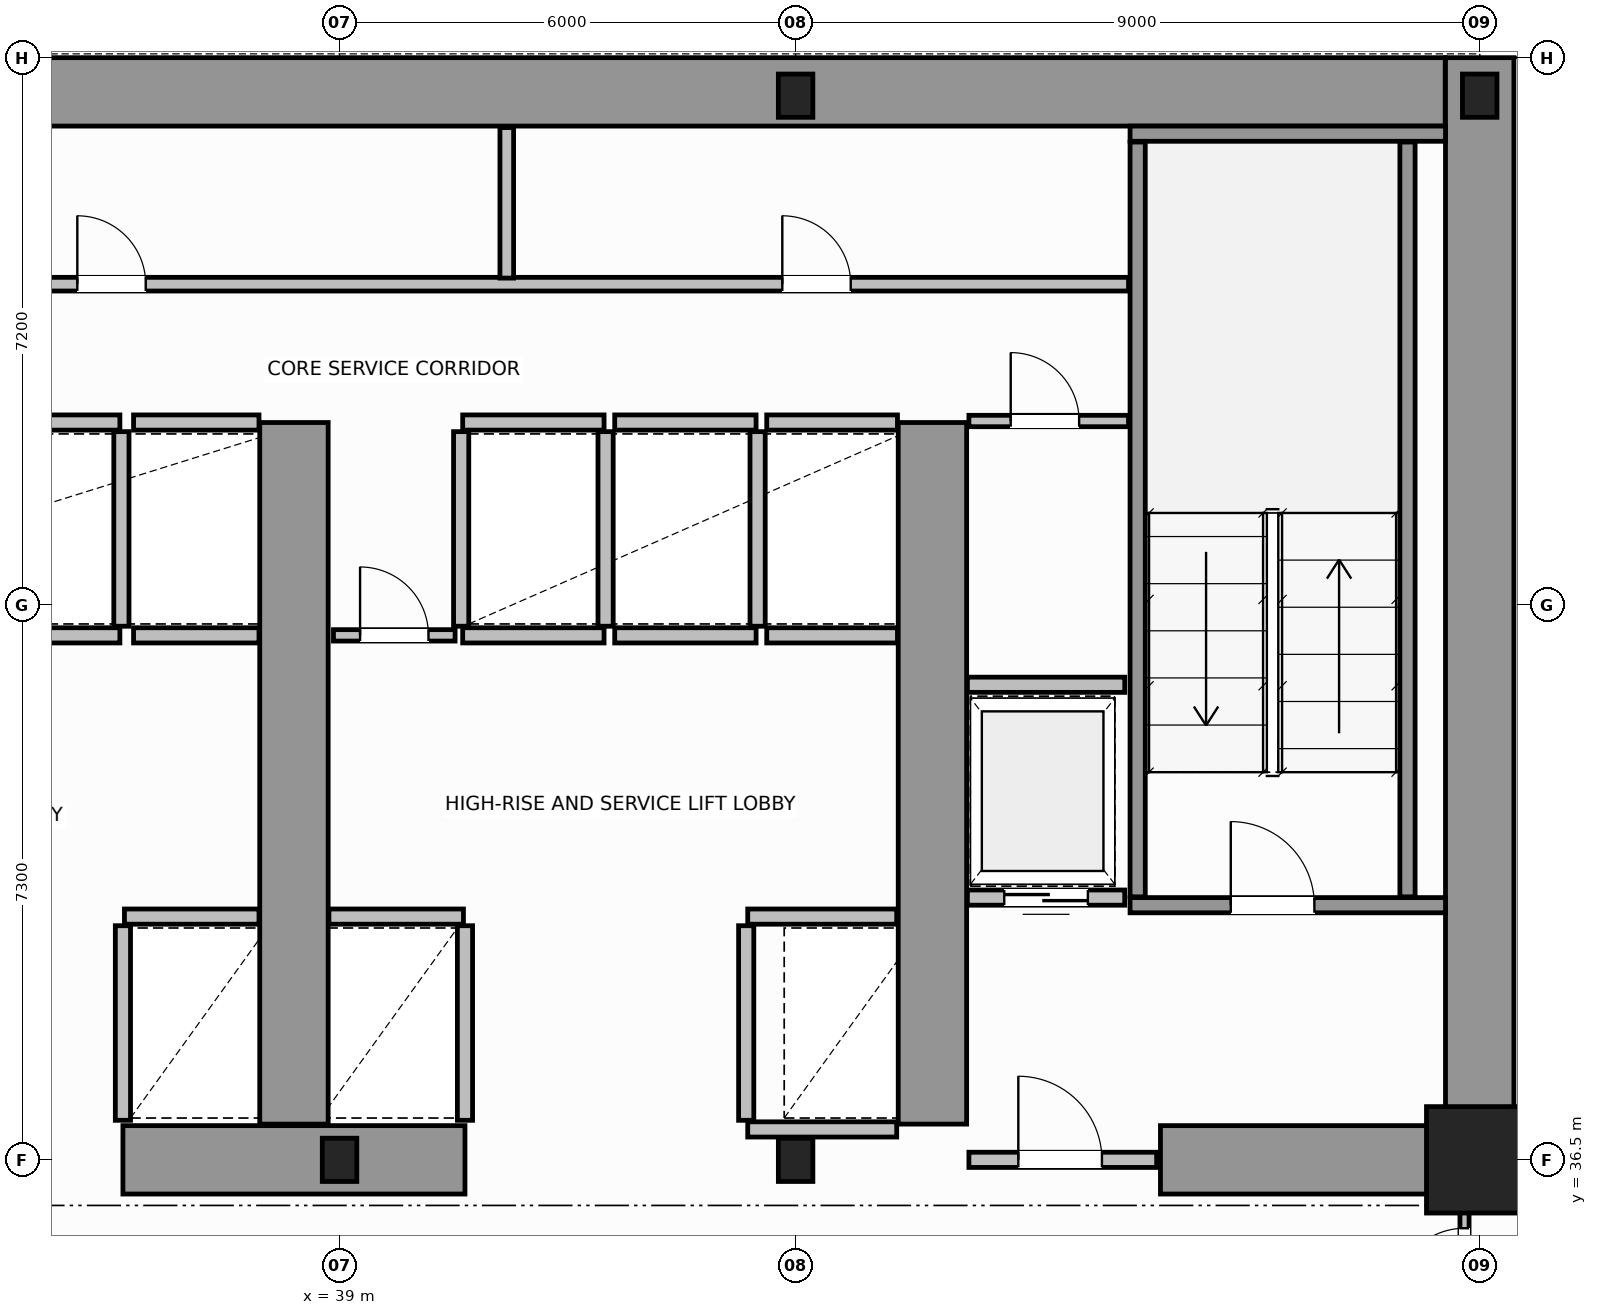
"""IFC4 building model, lengths in metres.
Left out: names, types, materials, properties, quantities, classifications, styles, units other than length and angle.
Written with IfcOpenShell. Run it as: python <this file> out.ifc"""

import sys

from ifc_helpers import new_model, si_unit, direction, frame, frame_2d, origin, origin_2d, place, context, subcontext, project, spatial, rectangle, i_section, extrude, source, transform, mapped, element, fill, save


model = new_model("IFC4")
c1 = context("Model", 3, precision=1e-05, world=origin(), true_north=direction((0.0, 1.0)))
c2 = subcontext(c1, "Body", "Model", "MODEL_VIEW")
j1 = project(units=[si_unit("LENGTHUNIT", "METRE"), si_unit("PLANEANGLEUNIT", "RADIAN")], contexts=[c1])
p1 = place(None, origin())
s1 = spatial("IfcSite", under=j1, at=p1, CompositionType="ELEMENT")
p2 = place(p1, origin())
s2 = spatial("IfcBuilding", under=s1, at=p2, CompositionType="ELEMENT")
p3 = place(p2, frame((0.0, 0.0, 68.2)))
s3 = spatial("IfcBuildingStorey", under=s2, at=p3, CompositionType="ELEMENT", Elevation=68.2)
m1 = source(origin(), c2, "Body", "SweptSolid", [
    extrude(i_section(OverallWidth=0.454, OverallDepth=0.569, WebThickness=0.078, FlangeThickness=0.08, FilletRadius=0.015, at=origin_2d()), origin(), (0.0, 0.0, 1.0), 3.8),
])
for number, where, z_axis, x_axis in (
    (1, (39.0, 36.5, 0.0), (0.0, 0.0, 1.0), (1.0, 0.0, 0.0)),
    (2, (45.0, 36.5, 0.0), (0.0, 0.0, 1.0), (1.0, 0.0, 0.0)),
):
    element("IfcColumn", number, at=place(p3, frame(where, z_axis=z_axis, x_axis=x_axis)), inside=s3, PredefinedType="COLUMN", context=c2, shape_type="MappedRepresentation", body=[
        mapped(m1, transform((0.0, 0.0, 0.0), scale=1.0)),
    ])
m2 = source(origin(), c2, "Body", "SweptSolid", [
    extrude(rectangle(XDim=1.4, YDim=1.4, at=origin_2d()), origin(), (0.0, 0.0, 1.0), 3.8),
])
p4 = place(p3, frame((54.0, 36.5, 0.0), z_axis=(0.0, 0.0, 1.0), x_axis=(1.0, 0.0, 0.0)))
e3 = element("IfcColumn", 3, at=p4, inside=s3, PredefinedType="COLUMN", context=c2, shape_type="MappedRepresentation", body=[
    mapped(m2, transform((0.0, 0.0, 0.0), scale=1.0)),
])
for number, where, z_axis, x_axis in (
    (4, (45.0, 50.5, 0.0), (0.0, 0.0, 1.0), (1.0, 0.0, 0.0)),
    (5, (54.0, 50.5, 0.0), (0.0, 0.0, 1.0), (1.0, 0.0, 0.0)),
):
    element("IfcColumn", number, at=place(p3, frame(where, z_axis=z_axis, x_axis=x_axis)), inside=s3, PredefinedType="COLUMN", context=c2, shape_type="MappedRepresentation", body=[
        mapped(m1, transform((0.0, 0.0, 0.0), scale=1.0)),
    ])
p5 = place(p3, frame((34.002, 50.55, 0.0), z_axis=(0.0, 0.0, 1.0), x_axis=(1.0, 0.0, 0.0)))
e6 = element("IfcWall", 6, at=p5, inside=s3, PredefinedType="SHEAR", context=c2, shape_type="SweptSolid", body=[
    extrude(rectangle(XDim=19.544, YDim=0.9, at=frame_2d((9.772, 0.0))), origin(), (0.0, 0.0, 1.0), 3.8),
])
p6 = place(p3, frame((54.0, 36.5, 0.0), z_axis=(0.0, 0.0, 1.0), x_axis=(0.0, 1.0, 0.0)))
e7 = element("IfcWall", 7, at=p6, inside=s3, PredefinedType="SHEAR", context=c2, shape_type="SweptSolid", body=[
    extrude(rectangle(XDim=14.5, YDim=0.9, at=frame_2d((7.25, 0.0))), origin(), (0.0, 0.0, 1.0), 3.8),
])
p7 = place(p3, frame((36.15, 36.5, 0.0), z_axis=(0.0, 0.0, 1.0), x_axis=(1.0, 0.0, 0.0)))
e8 = element("IfcWall", 8, at=p7, inside=s3, PredefinedType="SHEAR", context=c2, shape_type="SweptSolid", body=[
    extrude(rectangle(XDim=4.5, YDim=0.9, at=frame_2d((2.25, 0.0))), origin(), (0.0, 0.0, 1.0), 3.8),
])
p8 = place(p3, frame((49.8, 36.5, 0.0), z_axis=(0.0, 0.0, 1.0), x_axis=(1.0, 0.0, 0.0)))
e9 = element("IfcWall", 9, at=p8, inside=s3, PredefinedType="SHEAR", context=c2, shape_type="SweptSolid", body=[
    extrude(rectangle(XDim=3.73, YDim=0.9, at=frame_2d((1.865, 0.0))), origin(), (0.0, 0.0, 1.0), 2.38),
])
for number, where, z_axis, x_axis in (
    (10, (38.4, 36.97, 0.0), (0.0, 0.0, 1.0), (0.0, 1.0, 0.0)),
    (11, (46.8, 36.97, 0.0), (0.0, 0.0, 1.0), (0.0, 1.0, 0.0)),
):
    element("IfcWall", number, at=place(p3, frame(where, z_axis=z_axis, x_axis=x_axis)), inside=s3, PredefinedType="SHEAR", context=c2, shape_type="SweptSolid", body=[
        extrude(rectangle(XDim=9.23, YDim=0.9, at=frame_2d((4.615, 0.0))), origin(), (0.0, 0.0, 1.0), 3.8),
    ])
p9 = place(p3, frame((49.4, 39.85, 0.0), z_axis=(0.0, 0.0, 1.0), x_axis=(1.0, 0.0, 0.0)))
e12 = element("IfcWall", 12, at=p9, inside=s3, PredefinedType="SOLIDWALL", context=c2, shape_type="SweptSolid", body=[
    extrude(rectangle(XDim=4.15, YDim=0.2, at=frame_2d((2.075, 0.0))), origin(), (0.0, 0.0, 1.0), 3.8),
])
p10 = place(p9, frame((1.325, 0.0, 0.0)))
e13 = element("IfcOpeningElement", 13, at=p10, cuts=e12, PredefinedType="OPENING", context=c2, shape_type="SweptSolid", body=[
    extrude(rectangle(XDim=1.1, YDim=2.15, at=frame_2d((0.55, 1.075))), frame((0.0, 0.11, 0.0), z_axis=(0.0, -1.0, 0.0), x_axis=(1.0, 0.0, 0.0)), (0.0, 0.0, 1.0), 0.22),
])
p11 = place(p3, frame((49.4, 50.0, 0.0), z_axis=(0.0, 0.0, 1.0), x_axis=(1.0, 0.0, 0.0)))
e14 = element("IfcWall", 14, at=p11, inside=s3, PredefinedType="SOLIDWALL", context=c2, shape_type="SweptSolid", body=[
    extrude(rectangle(XDim=4.15, YDim=0.2, at=frame_2d((2.075, 0.0))), origin(), (0.0, 0.0, 1.0), 3.8),
])
for number, where, z_axis, x_axis in (
    (15, (49.5, 39.96, 0.0), (0.0, 0.0, 1.0), (0.0, 1.0, 0.0)),
    (16, (53.05, 39.96, 0.0), (0.0, 0.0, 1.0), (0.0, 1.0, 0.0)),
):
    element("IfcWall", number, at=place(p3, frame(where, z_axis=z_axis, x_axis=x_axis)), inside=s3, PredefinedType="SOLIDWALL", context=c2, shape_type="SweptSolid", body=[
        extrude(rectangle(XDim=9.93, YDim=0.2, at=frame_2d((4.965, 0.0))), origin(), (0.0, 0.0, 1.0), 3.8),
    ])
p12 = place(p3, frame((47.28, 36.5, 0.0), z_axis=(0.0, 0.0, 1.0), x_axis=(1.0, 0.0, 0.0)))
e17 = element("IfcWall", 17, at=p12, inside=s3, PredefinedType="SOLIDWALL", context=c2, shape_type="SweptSolid", body=[
    extrude(rectangle(XDim=2.47, YDim=0.2, at=frame_2d((1.235, 0.0))), origin(), (0.0, 0.0, 1.0), 2.37),
])
p13 = place(p12, frame((0.65, 0.0, 0.0)))
e18 = element("IfcOpeningElement", 18, at=p13, cuts=e17, PredefinedType="OPENING", context=c2, shape_type="SweptSolid", body=[
    extrude(rectangle(XDim=1.1, YDim=2.15, at=frame_2d((0.55, 1.075))), frame((0.0, 0.11, 0.0), z_axis=(0.0, -1.0, 0.0), x_axis=(1.0, 0.0, 0.0)), (0.0, 0.0, 1.0), 0.22),
])
p14 = place(p3, frame((36.17, 39.7, 0.0), z_axis=(0.0, 0.0, 1.0), x_axis=(1.0, 0.0, 0.0)))
e19 = element("IfcWall", 19, at=p14, inside=s3, PredefinedType="SOLIDWALL", context=c2, shape_type="SweptSolid", body=[
    extrude(rectangle(XDim=1.77, YDim=0.2, at=frame_2d((0.885, 0.0))), origin(), (0.0, 0.0, 1.0), 3.58),
])
p15 = place(p3, frame((36.15, 37.02, 0.0), z_axis=(0.0, 0.0, 1.0), x_axis=(0.0, 1.0, 0.0)))
e20 = element("IfcWall", 20, at=p15, inside=s3, PredefinedType="SOLIDWALL", context=c2, shape_type="SweptSolid", body=[
    extrude(rectangle(XDim=2.56, YDim=0.2, at=frame_2d((1.28, 0.0))), origin(), (0.0, 0.0, 1.0), 3.58),
])
for number, where, z_axis, x_axis in (
    (21, (34.19, 43.4, 0.0), (0.0, 0.0, 1.0), (1.0, 0.0, 0.0)),
    (22, (34.19, 46.2, 0.0), (0.0, 0.0, 1.0), (1.0, 0.0, 0.0)),
):
    element("IfcWall", number, at=place(p3, frame(where, z_axis=z_axis, x_axis=x_axis)), inside=s3, PredefinedType="SOLIDWALL", context=c2, shape_type="SweptSolid", body=[
        extrude(rectangle(XDim=1.92, YDim=0.2, at=frame_2d((0.96, 0.0))), origin(), (0.0, 0.0, 1.0), 3.58),
    ])
p16 = place(p3, frame((36.13, 43.52, 0.0), z_axis=(0.0, 0.0, 1.0), x_axis=(0.0, 1.0, 0.0)))
e23 = element("IfcWall", 23, at=p16, inside=s3, PredefinedType="SOLIDWALL", context=c2, shape_type="SweptSolid", body=[
    extrude(rectangle(XDim=2.56, YDim=0.2, at=frame_2d((1.28, 0.0))), origin(), (0.0, 0.0, 1.0), 3.58),
])
for number, where, z_axis, x_axis in (
    (24, (36.29, 43.4, 0.0), (0.0, 0.0, 1.0), (1.0, 0.0, 0.0)),
    (25, (36.29, 46.2, 0.0), (0.0, 0.0, 1.0), (1.0, 0.0, 0.0)),
):
    element("IfcWall", number, at=place(p3, frame(where, z_axis=z_axis, x_axis=x_axis)), inside=s3, PredefinedType="SOLIDWALL", context=c2, shape_type="SweptSolid", body=[
        extrude(rectangle(XDim=1.65, YDim=0.2, at=frame_2d((0.825, 0.0))), origin(), (0.0, 0.0, 1.0), 3.58),
    ])
p17 = place(p3, frame((38.86, 39.7, 0.0), z_axis=(0.0, 0.0, 1.0), x_axis=(1.0, 0.0, 0.0)))
e26 = element("IfcWall", 26, at=p17, inside=s3, PredefinedType="SOLIDWALL", context=c2, shape_type="SweptSolid", body=[
    extrude(rectangle(XDim=1.77, YDim=0.2, at=frame_2d((0.885, 0.0))), origin(), (0.0, 0.0, 1.0), 3.58),
])
p18 = place(p3, frame((40.65, 37.02, 0.0), z_axis=(0.0, 0.0, 1.0), x_axis=(0.0, 1.0, 0.0)))
e27 = element("IfcWall", 27, at=p18, inside=s3, PredefinedType="SOLIDWALL", context=c2, shape_type="SweptSolid", body=[
    extrude(rectangle(XDim=2.56, YDim=0.2, at=frame_2d((1.28, 0.0))), origin(), (0.0, 0.0, 1.0), 3.58),
])
p19 = place(p3, frame((44.37, 39.7, 0.0), z_axis=(0.0, 0.0, 1.0), x_axis=(1.0, 0.0, 0.0)))
e28 = element("IfcWall", 28, at=p19, inside=s3, PredefinedType="SOLIDWALL", context=c2, shape_type="SweptSolid", body=[
    extrude(rectangle(XDim=1.96, YDim=0.2, at=frame_2d((0.98, 0.0))), origin(), (0.0, 0.0, 1.0), 3.58),
])
p20 = place(p3, frame((44.37, 36.9, 0.0), z_axis=(0.0, 0.0, 1.0), x_axis=(1.0, 0.0, 0.0)))
e29 = element("IfcWall", 29, at=p20, inside=s3, PredefinedType="SOLIDWALL", context=c2, shape_type="SweptSolid", body=[
    extrude(rectangle(XDim=1.96, YDim=0.2, at=frame_2d((0.98, 0.0))), origin(), (0.0, 0.0, 1.0), 2.37),
])
p21 = place(p3, frame((44.35, 37.02, 0.0), z_axis=(0.0, 0.0, 1.0), x_axis=(0.0, 1.0, 0.0)))
e30 = element("IfcWall", 30, at=p21, inside=s3, PredefinedType="SOLIDWALL", context=c2, shape_type="SweptSolid", body=[
    extrude(rectangle(XDim=2.56, YDim=0.2, at=frame_2d((1.28, 0.0))), origin(), (0.0, 0.0, 1.0), 3.58),
])
for number, where, z_axis, x_axis in (
    (31, (40.62, 43.4, 0.0), (0.0, 0.0, 1.0), (1.0, 0.0, 0.0)),
    (32, (40.62, 46.2, 0.0), (0.0, 0.0, 1.0), (1.0, 0.0, 0.0)),
):
    element("IfcWall", number, at=place(p3, frame(where, z_axis=z_axis, x_axis=x_axis)), inside=s3, PredefinedType="SOLIDWALL", context=c2, shape_type="SweptSolid", body=[
        extrude(rectangle(XDim=1.86, YDim=0.2, at=frame_2d((0.93, 0.0))), origin(), (0.0, 0.0, 1.0), 3.58),
    ])
for number, where, z_axis, x_axis in (
    (33, (40.6, 43.52, 0.0), (0.0, 0.0, 1.0), (0.0, 1.0, 0.0)),
    (34, (42.5, 43.52, 0.0), (0.0, 0.0, 1.0), (0.0, 1.0, 0.0)),
):
    element("IfcWall", number, at=place(p3, frame(where, z_axis=z_axis, x_axis=x_axis)), inside=s3, PredefinedType="SOLIDWALL", context=c2, shape_type="SweptSolid", body=[
        extrude(rectangle(XDim=2.56, YDim=0.2, at=frame_2d((1.28, 0.0))), origin(), (0.0, 0.0, 1.0), 3.58),
    ])
for number, where, z_axis, x_axis in (
    (35, (42.62, 43.4, 0.0), (0.0, 0.0, 1.0), (1.0, 0.0, 0.0)),
    (36, (42.62, 46.2, 0.0), (0.0, 0.0, 1.0), (1.0, 0.0, 0.0)),
):
    element("IfcWall", number, at=place(p3, frame(where, z_axis=z_axis, x_axis=x_axis)), inside=s3, PredefinedType="SOLIDWALL", context=c2, shape_type="SweptSolid", body=[
        extrude(rectangle(XDim=1.86, YDim=0.2, at=frame_2d((0.93, 0.0))), origin(), (0.0, 0.0, 1.0), 3.58),
    ])
p22 = place(p3, frame((44.5, 43.52, 0.0), z_axis=(0.0, 0.0, 1.0), x_axis=(0.0, 1.0, 0.0)))
e37 = element("IfcWall", 37, at=p22, inside=s3, PredefinedType="SOLIDWALL", context=c2, shape_type="SweptSolid", body=[
    extrude(rectangle(XDim=2.56, YDim=0.2, at=frame_2d((1.28, 0.0))), origin(), (0.0, 0.0, 1.0), 3.58),
])
for number, where, z_axis, x_axis in (
    (38, (44.62, 43.4, 0.0), (0.0, 0.0, 1.0), (1.0, 0.0, 0.0)),
    (39, (44.62, 46.2, 0.0), (0.0, 0.0, 1.0), (1.0, 0.0, 0.0)),
):
    element("IfcWall", number, at=place(p3, frame(where, z_axis=z_axis, x_axis=x_axis)), inside=s3, PredefinedType="SOLIDWALL", context=c2, shape_type="SweptSolid", body=[
        extrude(rectangle(XDim=1.72, YDim=0.2, at=frame_2d((0.86, 0.0))), origin(), (0.0, 0.0, 1.0), 3.58),
    ])
p23 = place(p3, frame((47.26, 39.95, 0.0), z_axis=(0.0, 0.0, 1.0), x_axis=(1.0, 0.0, 0.0)))
e40 = element("IfcWall", 40, at=p23, inside=s3, PredefinedType="SOLIDWALL", context=c2, shape_type="SweptSolid", body=[
    extrude(rectangle(XDim=2.07, YDim=0.2, at=frame_2d((1.035, 0.0))), origin(), (0.0, 0.0, 1.0), 3.58),
])
p24 = place(p23, frame((0.485, 0.0, 0.0)))
e41 = element("IfcOpeningElement", 41, at=p24, cuts=e40, PredefinedType="OPENING", context=c2, shape_type="SweptSolid", body=[
    extrude(rectangle(XDim=1.1, YDim=2.15, at=frame_2d((0.55, 1.075))), frame((0.0, 0.11, 0.0), z_axis=(0.0, -1.0, 0.0), x_axis=(1.0, 0.0, 0.0)), (0.0, 0.0, 1.0), 0.22),
])
p25 = place(p3, frame((47.26, 42.75, 0.0), z_axis=(0.0, 0.0, 1.0), x_axis=(1.0, 0.0, 0.0)))
e42 = element("IfcWall", 42, at=p25, inside=s3, PredefinedType="SOLIDWALL", context=c2, shape_type="SweptSolid", body=[
    extrude(rectangle(XDim=2.07, YDim=0.2, at=frame_2d((1.035, 0.0))), origin(), (0.0, 0.0, 1.0), 3.58),
])
p26 = place(p3, frame((47.28, 46.22, 0.0), z_axis=(0.0, 0.0, 1.0), x_axis=(1.0, 0.0, 0.0)))
e43 = element("IfcWall", 43, at=p26, inside=s3, PredefinedType="PARTITIONING", context=c2, shape_type="SweptSolid", body=[
    extrude(rectangle(XDim=2.1, YDim=0.15, at=frame_2d((1.05, 0.0))), origin(), (0.0, 0.0, 1.0), 3.58),
])
p27 = place(p26, frame((0.55, 0.0, 0.0)))
e44 = element("IfcOpeningElement", 44, at=p27, cuts=e43, PredefinedType="OPENING", context=c2, shape_type="SweptSolid", body=[
    extrude(rectangle(XDim=0.9, YDim=2.1, at=frame_2d((0.45, 1.05))), frame((0.0, 0.085, 0.0), z_axis=(0.0, -1.0, 0.0), x_axis=(1.0, 0.0, 0.0)), (0.0, 0.0, 1.0), 0.17),
])
p28 = place(p3, frame((38.92, 43.4, 0.0), z_axis=(0.0, 0.0, 1.0), x_axis=(1.0, 0.0, 0.0)))
e45 = element("IfcWall", 45, at=p28, inside=s3, PredefinedType="PARTITIONING", context=c2, shape_type="SweptSolid", body=[
    extrude(rectangle(XDim=1.6, YDim=0.15, at=frame_2d((0.8, 0.0))), origin(), (0.0, 0.0, 1.0), 3.58),
])
p29 = place(p28, frame((0.35, 0.0, 0.0)))
e46 = element("IfcOpeningElement", 46, at=p29, cuts=e45, PredefinedType="OPENING", context=c2, shape_type="SweptSolid", body=[
    extrude(rectangle(XDim=0.9, YDim=2.1, at=frame_2d((0.45, 1.05))), frame((0.0, 0.085, 0.0), z_axis=(0.0, -1.0, 0.0), x_axis=(1.0, 0.0, 0.0)), (0.0, 0.0, 1.0), 0.17),
])
p30 = place(p3, frame((18.62, 48.02, 0.0), z_axis=(0.0, 0.0, 1.0), x_axis=(1.0, 0.0, 0.0)))
e47 = element("IfcWall", 47, at=p30, inside=s3, PredefinedType="PLUMBINGWALL", context=c2, shape_type="SweptSolid", body=[
    extrude(rectangle(XDim=30.76, YDim=0.18, at=frame_2d((15.38, 0.0))), origin(), (0.0, 0.0, 1.0), 3.58),
])
p31 = place(p30, frame((1.955, 0.0, 0.0)))
e48 = element("IfcOpeningElement", 48, at=p31, cuts=e47, PredefinedType="OPENING", context=c2, shape_type="SweptSolid", body=[
    extrude(rectangle(XDim=0.9, YDim=2.15, at=frame_2d((0.45, 1.075))), frame((0.0, 0.1, 0.0), z_axis=(0.0, -1.0, 0.0), x_axis=(1.0, 0.0, 0.0)), (0.0, 0.0, 1.0), 0.2),
])
p32 = place(p30, frame((8.03, 0.0, 0.0)))
e49 = element("IfcOpeningElement", 49, at=p32, cuts=e47, PredefinedType="OPENING", context=c2, shape_type="SweptSolid", body=[
    extrude(rectangle(XDim=0.9, YDim=2.15, at=frame_2d((0.45, 1.075))), frame((0.0, 0.1, 0.0), z_axis=(0.0, -1.0, 0.0), x_axis=(1.0, 0.0, 0.0)), (0.0, 0.0, 1.0), 0.2),
])
p33 = place(p30, frame((16.93, 0.0, 0.0)))
e50 = element("IfcOpeningElement", 50, at=p33, cuts=e47, PredefinedType="OPENING", context=c2, shape_type="SweptSolid", body=[
    extrude(rectangle(XDim=0.9, YDim=2.15, at=frame_2d((0.45, 1.075))), frame((0.0, 0.1, 0.0), z_axis=(0.0, -1.0, 0.0), x_axis=(1.0, 0.0, 0.0)), (0.0, 0.0, 1.0), 0.2),
])
p34 = place(p30, frame((26.205, 0.0, 0.0)))
e51 = element("IfcOpeningElement", 51, at=p34, cuts=e47, PredefinedType="OPENING", context=c2, shape_type="SweptSolid", body=[
    extrude(rectangle(XDim=0.9, YDim=2.15, at=frame_2d((0.45, 1.075))), frame((0.0, 0.1, 0.0), z_axis=(0.0, -1.0, 0.0), x_axis=(1.0, 0.0, 0.0)), (0.0, 0.0, 1.0), 0.2),
])
p35 = place(p3, frame((41.2, 48.1, 0.0), z_axis=(0.0, 0.0, 1.0), x_axis=(0.0, 1.0, 0.0)))
e52 = element("IfcWall", 52, at=p35, inside=s3, PredefinedType="PLUMBINGWALL", context=c2, shape_type="SweptSolid", body=[
    extrude(rectangle(XDim=1.98, YDim=0.18, at=frame_2d((0.99, 0.0))), origin(), (0.0, 0.0, 1.0), 3.58),
])
p36 = place(p3, frame((53.8, 34.0, 0.0), z_axis=(0.0, 0.0, 1.0), x_axis=(0.0, 1.0, 0.0)))
e53 = element("IfcWall", 53, at=p36, inside=s3, PredefinedType="PARTITIONING", context=c2, shape_type="SweptSolid", body=[
    extrude(rectangle(XDim=2.44, YDim=0.12, at=frame_2d((1.22, 0.0))), origin(), (0.0, 0.0, 1.0), 3.58),
])
p37 = place(p36, frame((0.7, 0.0, 0.0)))
e54 = element("IfcOpeningElement", 54, at=p37, cuts=e53, PredefinedType="OPENING", context=c2, shape_type="SweptSolid", body=[
    extrude(rectangle(XDim=0.9, YDim=2.15, at=frame_2d((0.45, 1.075))), frame((0.0, 0.07, 0.0), z_axis=(0.0, -1.0, 0.0), x_axis=(1.0, 0.0, 0.0)), (0.0, 0.0, 1.0), 0.14),
])
m3 = source(origin(), c2, "Body", "SweptSolid", [
    extrude(rectangle(XDim=1.1, YDim=2.15, at=frame_2d((0.55, 1.075))), frame((0.0, 0.025, 0.0), z_axis=(0.0, -1.0, 0.0), x_axis=(1.0, 0.0, 0.0)), (0.0, 0.0, 1.0), 0.05),
])
p38 = place(p10, origin())
e55 = element("IfcDoor", 55, at=p38, inside=s3, OperationType="SINGLE_SWING_RIGHT", PredefinedType="DOOR", context=c2, shape_type="MappedRepresentation", body=[
    mapped(m3, transform((0.0, 0.0, 0.0), scale=1.0)),
])
fill(e13, e55)
p39 = place(p13, origin())
e56 = element("IfcDoor", 56, at=p39, inside=s3, OperationType="SINGLE_SWING_LEFT", PredefinedType="DOOR", context=c2, shape_type="MappedRepresentation", body=[
    mapped(m3, transform((0.0, 0.0, 0.0), scale=1.0)),
])
fill(e18, e56)
p40 = place(p24, origin())
e57 = element("IfcDoor", 57, at=p40, inside=s3, OperationType="DOUBLE_DOOR_SLIDING", PredefinedType="DOOR", context=c2, shape_type="MappedRepresentation", body=[
    mapped(m3, transform((0.0, 0.0, 0.0), scale=1.0)),
])
fill(e41, e57)
m4 = source(origin(), c2, "Body", "SweptSolid", [
    extrude(rectangle(XDim=0.9, YDim=2.1, at=frame_2d((0.45, 1.05))), frame((0.0, 0.025, 0.0), z_axis=(0.0, -1.0, 0.0), x_axis=(1.0, 0.0, 0.0)), (0.0, 0.0, 1.0), 0.05),
])
p41 = place(p27, origin())
e58 = element("IfcDoor", 58, at=p41, inside=s3, OperationType="SINGLE_SWING_RIGHT", PredefinedType="DOOR", context=c2, shape_type="MappedRepresentation", body=[
    mapped(m4, transform((0.0, 0.0, 0.0), scale=1.0)),
])
fill(e44, e58)
p42 = place(p29, origin())
e59 = element("IfcDoor", 59, at=p42, inside=s3, OperationType="SINGLE_SWING_LEFT", PredefinedType="DOOR", context=c2, shape_type="MappedRepresentation", body=[
    mapped(m4, transform((0.0, 0.0, 0.0), scale=1.0)),
])
fill(e46, e59)
m5 = source(origin(), c2, "Body", "SweptSolid", [
    extrude(rectangle(XDim=0.9, YDim=2.15, at=frame_2d((0.45, 1.075))), frame((0.0, 0.025, 0.0), z_axis=(0.0, -1.0, 0.0), x_axis=(1.0, 0.0, 0.0)), (0.0, 0.0, 1.0), 0.05),
])
p43 = place(p33, origin())
e60 = element("IfcDoor", 60, at=p43, inside=s3, OperationType="SINGLE_SWING_LEFT", PredefinedType="DOOR", context=c2, shape_type="MappedRepresentation", body=[
    mapped(m5, transform((0.0, 0.0, 0.0), scale=1.0)),
])
fill(e50, e60)
p44 = place(p34, origin())
e61 = element("IfcDoor", 61, at=p44, inside=s3, OperationType="SINGLE_SWING_RIGHT", PredefinedType="DOOR", context=c2, shape_type="MappedRepresentation", body=[
    mapped(m5, transform((0.0, 0.0, 0.0), scale=1.0)),
])
fill(e51, e61)
p45 = place(p37, origin())
e62 = element("IfcDoor", 62, at=p45, inside=s3, OperationType="SINGLE_SWING_RIGHT", PredefinedType="DOOR", context=c2, shape_type="MappedRepresentation", body=[
    mapped(m5, transform((0.0, 0.0, 0.0), scale=1.0)),
])
fill(e54, e62)
save(model, sys.argv[1])
